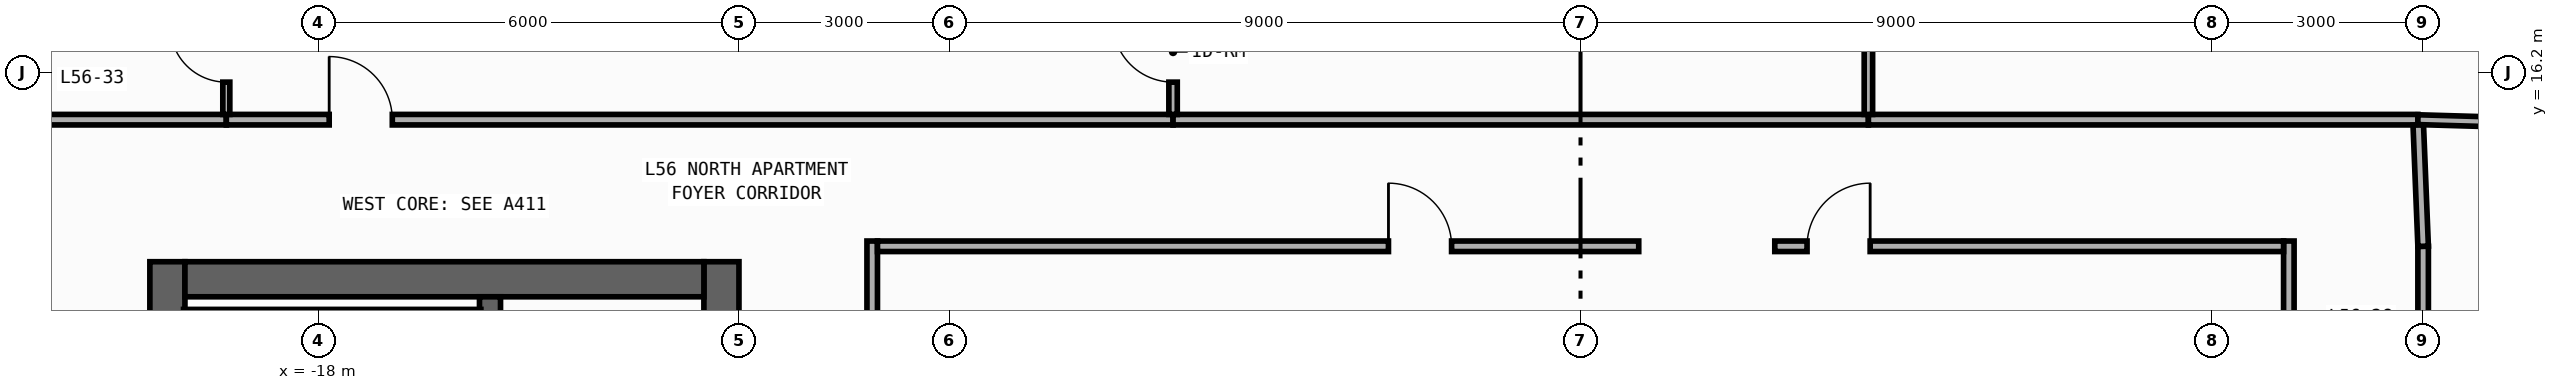
"""IFC4 building model, lengths in metres.
Left out: names, types, materials, properties, quantities, classifications, styles, units other than length and angle.
Written with IfcOpenShell. Run it as: python <this file> out.ifc"""

import sys

from ifc_helpers import new_model, si_unit, direction, frame, frame_2d, origin, place, context, subcontext, project, spatial, rectangle, extrude, element, fill, save


model = new_model("IFC4")
c1 = context("Model", 3, precision=1e-05, world=origin(), true_north=direction((0.0, 1.0)))
c2 = subcontext(c1, "Body", "Model", "MODEL_VIEW")
j1 = project(units=[si_unit("LENGTHUNIT", "METRE"), si_unit("PLANEANGLEUNIT", "RADIAN")], contexts=[c1])
p1 = place(None, origin())
s1 = spatial("IfcSite", under=j1, at=p1, CompositionType="ELEMENT")
p2 = place(p1, origin())
s2 = spatial("IfcBuilding", under=s1, at=p2, CompositionType="ELEMENT")
p3 = place(p2, frame((0.0, 0.0, 240.4)))
s3 = spatial("IfcBuildingStorey", under=s2, at=p3, CompositionType="ELEMENT", Elevation=240.4)
p4 = place(p3, frame((-20.15, -13.5, 0.0), z_axis=(0.0, 0.0, 1.0), x_axis=(0.0, 1.0, 0.0)))
e1 = element("IfcWall", 1, at=p4, inside=s3, PredefinedType="SHEAR", context=c2, shape_type="SweptSolid", body=[
    extrude(rectangle(XDim=27.0, YDim=0.5, at=frame_2d((13.5, 0.0))), origin(), (0.0, 0.0, 1.0), 3.34),
])
p5 = place(p3, frame((-12.25, -13.5, 0.0), z_axis=(0.0, 0.0, 1.0), x_axis=(0.0, 1.0, 0.0)))
e2 = element("IfcWall", 2, at=p5, inside=s3, PredefinedType="SHEAR", context=c2, shape_type="SweptSolid", body=[
    extrude(rectangle(XDim=27.0, YDim=0.5, at=frame_2d((13.5, 0.0))), origin(), (0.0, 0.0, 1.0), 3.34),
])
p6 = place(p5, frame((15.175, 0.0, 0.0)))
e3 = element("IfcOpeningElement", 3, at=p6, cuts=e2, PredefinedType="OPENING", context=c2, shape_type="SweptSolid", body=[
    extrude(rectangle(XDim=0.85, YDim=2.1, at=frame_2d((0.425, 1.05))), frame((0.0, 0.26, 0.0), z_axis=(0.0, -1.0, 0.0), x_axis=(1.0, 0.0, 0.0)), (0.0, 0.0, 1.0), 0.52),
])
p7 = place(p5, frame((21.275, 0.0, 0.0)))
e4 = element("IfcOpeningElement", 4, at=p7, cuts=e2, PredefinedType="OPENING", context=c2, shape_type="SweptSolid", body=[
    extrude(rectangle(XDim=0.85, YDim=2.1, at=frame_2d((0.425, 1.05))), frame((0.0, 0.26, 0.0), z_axis=(0.0, -1.0, 0.0), x_axis=(1.0, 0.0, 0.0)), (0.0, 0.0, 1.0), 0.52),
])
p8 = place(p5, frame((4.275, 0.0, 0.0)))
e5 = element("IfcOpeningElement", 5, at=p8, cuts=e2, PredefinedType="OPENING", context=c2, shape_type="SweptSolid", body=[
    extrude(rectangle(XDim=0.85, YDim=2.1, at=frame_2d((0.425, 1.05))), frame((0.0, 0.26, 0.0), z_axis=(0.0, -1.0, 0.0), x_axis=(1.0, 0.0, 0.0)), (0.0, 0.0, 1.0), 0.52),
])
p9 = place(p5, frame((10.275, 0.0, 0.0)))
e6 = element("IfcOpeningElement", 6, at=p9, cuts=e2, PredefinedType="OPENING", context=c2, shape_type="SweptSolid", body=[
    extrude(rectangle(XDim=0.85, YDim=2.1, at=frame_2d((0.425, 1.05))), frame((0.0, 0.26, 0.0), z_axis=(0.0, -1.0, 0.0), x_axis=(1.0, 0.0, 0.0)), (0.0, 0.0, 1.0), 0.52),
])
p10 = place(p5, frame((12.725, 0.0, 0.0)))
e7 = element("IfcOpeningElement", 7, at=p10, cuts=e2, PredefinedType="OPENING", context=c2, shape_type="SweptSolid", body=[
    extrude(rectangle(XDim=1.15, YDim=2.2, at=frame_2d((0.575, 1.1))), frame((0.0, 0.26, 0.0), z_axis=(0.0, -1.0, 0.0), x_axis=(1.0, 0.0, 0.0)), (0.0, 0.0, 1.0), 0.52),
])
p11 = place(p5, frame((1.625, 0.0, 0.0)))
e8 = element("IfcOpeningElement", 8, at=p11, cuts=e2, PredefinedType="OPENING", context=c2, shape_type="SweptSolid", body=[
    extrude(rectangle(XDim=0.85, YDim=2.1, at=frame_2d((0.425, 1.05))), frame((0.0, 0.26, 0.0), z_axis=(0.0, -1.0, 0.0), x_axis=(1.0, 0.0, 0.0)), (0.0, 0.0, 1.0), 0.52),
])
p12 = place(p3, frame((-19.9, 13.25, 0.0), z_axis=(0.0, 0.0, 1.0), x_axis=(1.0, 0.0, 0.0)))
e9 = element("IfcWall", 9, at=p12, inside=s3, PredefinedType="SHEAR", context=c2, shape_type="SweptSolid", body=[
    extrude(rectangle(XDim=7.4, YDim=0.5, at=frame_2d((3.7, 0.0))), origin(), (0.0, 0.0, 1.0), 3.34),
])
p13 = place(p3, frame((-15.55, -13.0, 0.0), z_axis=(0.0, 0.0, 1.0), x_axis=(0.0, 1.0, 0.0)))
e10 = element("IfcWall", 10, at=p13, inside=s3, PredefinedType="SHEAR", context=c2, shape_type="SweptSolid", body=[
    extrude(rectangle(XDim=26.0, YDim=0.3, at=frame_2d((13.0, 0.0))), origin(), (0.0, 0.0, 1.0), 3.34),
])
p14 = place(p13, frame((12.225, 0.0, 0.0)))
e11 = element("IfcOpeningElement", 11, at=p14, cuts=e10, PredefinedType="OPENING", context=c2, shape_type="SweptSolid", body=[
    extrude(rectangle(XDim=1.15, YDim=2.2, at=frame_2d((0.575, 1.1))), frame((0.0, 0.16, 0.0), z_axis=(0.0, -1.0, 0.0), x_axis=(1.0, 0.0, 0.0)), (0.0, 0.0, 1.0), 0.32),
])
p15 = place(p13, frame((1.125, 0.0, 0.0)))
e12 = element("IfcOpeningElement", 12, at=p15, cuts=e10, PredefinedType="OPENING", context=c2, shape_type="SweptSolid", body=[
    extrude(rectangle(XDim=0.85, YDim=2.1, at=frame_2d((0.425, 1.05))), frame((0.0, 0.16, 0.0), z_axis=(0.0, -1.0, 0.0), x_axis=(1.0, 0.0, 0.0)), (0.0, 0.0, 1.0), 0.32),
])
p16 = place(p3, frame((-19.92, 12.71, 0.0), z_axis=(0.0, 0.0, 1.0), x_axis=(1.0, 0.0, 0.0)))
e13 = element("IfcWall", 13, at=p16, inside=s3, PredefinedType="SHEAR", context=c2, shape_type="SweptSolid", body=[
    extrude(rectangle(XDim=4.24, YDim=0.22, at=frame_2d((2.12, 0.0))), origin(), (0.0, 0.0, 1.0), 3.34),
])
p17 = place(p3, frame((-10.1, 2.39, 0.0), z_axis=(0.0, 0.0, 1.0), x_axis=(0.0, 1.0, 0.0)))
e14 = element("IfcWall", 14, at=p17, inside=s3, PredefinedType="PARTITIONING", context=c2, shape_type="SweptSolid", body=[
    extrude(rectangle(XDim=11.405, YDim=0.15, at=frame_2d((5.703, 0.0))), origin(), (0.0, 0.0, 1.0), 3.34),
])
p18 = place(p17, frame((2.5, 0.0, 0.0)))
e15 = element("IfcOpeningElement", 15, at=p18, cuts=e14, PredefinedType="OPENING", context=c2, shape_type="SweptSolid", body=[
    extrude(rectangle(XDim=0.9, YDim=2.15, at=frame_2d((0.45, 1.075))), frame((0.0, 0.085, 0.0), z_axis=(0.0, -1.0, 0.0), x_axis=(1.0, 0.0, 0.0)), (0.0, 0.0, 1.0), 0.17),
])
p19 = place(p3, frame((12.015, 7.2, 0.0), z_axis=(0.0, 0.0, 1.0), x_axis=(0.0, 1.0, 0.0)))
e16 = element("IfcWall", 16, at=p19, inside=s3, PredefinedType="PARTITIONING", context=c2, shape_type="SweptSolid", body=[
    extrude(rectangle(XDim=6.52, YDim=0.15, at=frame_2d((3.26, 0.0))), origin(), (0.0, 0.0, 1.0), 3.34),
])
p20 = place(p19, frame((0.67, 0.0, 0.0)))
e17 = element("IfcOpeningElement", 17, at=p20, cuts=e16, PredefinedType="OPENING", context=c2, shape_type="SweptSolid", body=[
    extrude(rectangle(XDim=0.9, YDim=2.15, at=frame_2d((0.45, 1.075))), frame((0.0, 0.085, 0.0), z_axis=(0.0, -1.0, 0.0), x_axis=(1.0, 0.0, 0.0)), (0.0, 0.0, 1.0), 0.17),
])
p21 = place(p3, frame((10.1, 2.39, 0.0), z_axis=(0.0, 0.0, 1.0), x_axis=(0.0, 1.0, 0.0)))
e18 = element("IfcWall", 18, at=p21, inside=s3, PredefinedType="PARTITIONING", context=c2, shape_type="SweptSolid", body=[
    extrude(rectangle(XDim=11.405, YDim=0.15, at=frame_2d((5.703, 0.0))), origin(), (0.0, 0.0, 1.0), 3.34),
])
p22 = place(p21, frame((2.5, 0.0, 0.0)))
e19 = element("IfcOpeningElement", 19, at=p22, cuts=e18, PredefinedType="OPENING", context=c2, shape_type="SweptSolid", body=[
    extrude(rectangle(XDim=0.9, YDim=2.15, at=frame_2d((0.45, 1.075))), frame((0.0, 0.085, 0.0), z_axis=(0.0, -1.0, 0.0), x_axis=(1.0, 0.0, 0.0)), (0.0, 0.0, 1.0), 0.17),
])
p23 = place(p3, frame((-21.955, 15.525, 0.0), z_axis=(0.0, 0.0, 1.0), x_axis=(1.0, 0.0, 0.0)))
e20 = element("IfcWall", 20, at=p23, inside=s3, PredefinedType="PARTITIONING", context=c2, shape_type="SweptSolid", body=[
    extrude(rectangle(XDim=2.645, YDim=0.15, at=frame_2d((1.323, 0.0))), origin(), (0.0, 0.0, 1.0), 3.34),
])
p24 = place(p3, frame((-19.31, 15.525, 0.0), z_axis=(0.0, 0.0, 1.0), x_axis=(1.0, 0.0, 0.0)))
e21 = element("IfcWall", 21, at=p24, inside=s3, PredefinedType="PARTITIONING", context=c2, shape_type="SweptSolid", body=[
    extrude(rectangle(XDim=13.5, YDim=0.15, at=frame_2d((6.75, 0.0))), origin(), (0.0, 0.0, 1.0), 3.34),
])
p25 = place(p24, frame((1.467, 0.0, 0.0)))
e22 = element("IfcOpeningElement", 22, at=p25, cuts=e21, PredefinedType="OPENING", context=c2, shape_type="SweptSolid", body=[
    extrude(rectangle(XDim=0.9, YDim=2.15, at=frame_2d((0.45, 1.075))), frame((0.0, 0.085, 0.0), z_axis=(0.0, -1.0, 0.0), x_axis=(1.0, 0.0, 0.0)), (0.0, 0.0, 1.0), 0.17),
])
p26 = place(p3, frame((-5.81, 15.525, 0.0), z_axis=(0.0, 0.0, 1.0), x_axis=(1.0, 0.0, 0.0)))
e23 = element("IfcWall", 23, at=p26, inside=s3, PredefinedType="PARTITIONING", context=c2, shape_type="SweptSolid", body=[
    extrude(rectangle(XDim=9.915, YDim=0.15, at=frame_2d((4.958, 0.0))), origin(), (0.0, 0.0, 1.0), 3.34),
])
p27 = place(p3, frame((4.105, 15.525, 0.0), z_axis=(0.0, 0.0, 1.0), x_axis=(1.0, 0.0, 0.0)))
e24 = element("IfcWall", 24, at=p27, inside=s3, PredefinedType="PARTITIONING", context=c2, shape_type="SweptSolid", body=[
    extrude(rectangle(XDim=7.835, YDim=0.15, at=frame_2d((3.917, 0.0))), origin(), (0.0, 0.0, 1.0), 3.34),
])
p28 = place(p3, frame((12.015, 13.72, 0.0), z_axis=(0.0, 0.0, 1.0), x_axis=(-0.040046877756, 0.99919780203, 0.0)))
e25 = element("IfcWall", 25, at=p28, inside=s3, PredefinedType="PARTITIONING", context=c2, shape_type="SweptSolid", body=[
    extrude(rectangle(XDim=1.731, YDim=0.15, at=frame_2d((0.866, 0.0))), origin(), (0.0, 0.0, 1.0), 3.34),
])
p29 = place(p3, frame((-10.025, 13.72, 0.0), z_axis=(0.0, 0.0, 1.0), x_axis=(1.0, 0.0, 0.0)))
e26 = element("IfcWall", 26, at=p29, inside=s3, PredefinedType="PARTITIONING", context=c2, shape_type="SweptSolid", body=[
    extrude(rectangle(XDim=10.855, YDim=0.15, at=frame_2d((5.427, 0.0))), origin(), (0.0, 0.0, 1.0), 3.34),
])
p30 = place(p29, frame((7.286, 0.0, 0.0)))
e27 = element("IfcOpeningElement", 27, at=p30, cuts=e26, PredefinedType="OPENING", context=c2, shape_type="SweptSolid", body=[
    extrude(rectangle(XDim=0.9, YDim=2.15, at=frame_2d((0.45, 1.075))), frame((0.0, 0.085, 0.0), z_axis=(0.0, -1.0, 0.0), x_axis=(1.0, 0.0, 0.0)), (0.0, 0.0, 1.0), 0.17),
])
p31 = place(p3, frame((2.77, 13.72, 0.0), z_axis=(0.0, 0.0, 1.0), x_axis=(1.0, 0.0, 0.0)))
e28 = element("IfcWall", 28, at=p31, inside=s3, PredefinedType="PARTITIONING", context=c2, shape_type="SweptSolid", body=[
    extrude(rectangle(XDim=7.255, YDim=0.15, at=frame_2d((3.627, 0.0))), origin(), (0.0, 0.0, 1.0), 3.34),
])
p32 = place(p31, frame((0.46, 0.0, 0.0)))
e29 = element("IfcOpeningElement", 29, at=p32, cuts=e28, PredefinedType="OPENING", context=c2, shape_type="SweptSolid", body=[
    extrude(rectangle(XDim=0.9, YDim=2.15, at=frame_2d((0.45, 1.075))), frame((0.0, 0.085, 0.0), z_axis=(0.0, -1.0, 0.0), x_axis=(1.0, 0.0, 0.0)), (0.0, 0.0, 1.0), 0.17),
])
p33 = place(p3, frame((-19.31, 15.6, 0.0), z_axis=(0.0, 0.0, 1.0), x_axis=(0.0, 1.0, 0.0)))
e30 = element("IfcWall", 30, at=p33, inside=s3, PredefinedType="PARTITIONING", context=c2, shape_type="SweptSolid", body=[
    extrude(rectangle(XDim=2.5, YDim=0.1, at=frame_2d((1.25, 0.0))), origin(), (0.0, 0.0, 1.0), 3.34),
])
p34 = place(p33, frame((0.46, 0.0, 0.0)))
e31 = element("IfcOpeningElement", 31, at=p34, cuts=e30, PredefinedType="OPENING", context=c2, shape_type="SweptSolid", body=[
    extrude(rectangle(XDim=0.8, YDim=2.1, at=frame_2d((0.4, 1.05))), frame((0.0, 0.06, 0.0), z_axis=(0.0, -1.0, 0.0), x_axis=(1.0, 0.0, 0.0)), (0.0, 0.0, 1.0), 0.12),
])
p35 = place(p3, frame((-5.81, 15.6, 0.0), z_axis=(0.0, 0.0, 1.0), x_axis=(0.0, 1.0, 0.0)))
e32 = element("IfcWall", 32, at=p35, inside=s3, PredefinedType="PARTITIONING", context=c2, shape_type="SweptSolid", body=[
    extrude(rectangle(XDim=4.5, YDim=0.12, at=frame_2d((2.25, 0.0))), origin(), (0.0, 0.0, 1.0), 3.34),
])
p36 = place(p35, frame((0.46, 0.0, 0.0)))
e33 = element("IfcOpeningElement", 33, at=p36, cuts=e32, PredefinedType="OPENING", context=c2, shape_type="SweptSolid", body=[
    extrude(rectangle(XDim=0.86, YDim=2.15, at=frame_2d((0.43, 1.075))), frame((0.0, 0.07, 0.0), z_axis=(0.0, -1.0, 0.0), x_axis=(1.0, 0.0, 0.0)), (0.0, 0.0, 1.0), 0.14),
])
p37 = place(p3, frame((4.105, 15.6, 0.0), z_axis=(0.0, 0.0, 1.0), x_axis=(0.0, 1.0, 0.0)))
e34 = element("IfcWall", 34, at=p37, inside=s3, PredefinedType="PARTITIONING", context=c2, shape_type="SweptSolid", body=[
    extrude(rectangle(XDim=9.255, YDim=0.12, at=frame_2d((4.627, 0.0))), origin(), (0.0, 0.0, 1.0), 3.34),
])
p38 = place(p37, frame((7.995, 0.0, 0.0)))
e35 = element("IfcOpeningElement", 35, at=p38, cuts=e34, PredefinedType="OPENING", context=c2, shape_type="SweptSolid", body=[
    extrude(rectangle(XDim=0.8, YDim=2.1, at=frame_2d((0.4, 1.05))), frame((0.0, 0.07, 0.0), z_axis=(0.0, -1.0, 0.0), x_axis=(1.0, 0.0, 0.0)), (0.0, 0.0, 1.0), 0.14),
])
p39 = place(p3, frame((11.94, 15.525, 0.0), z_axis=(0.0, 0.0, 1.0), x_axis=(0.99958000177, -0.028979649098, 0.0)))
e36 = element("IfcWall", 36, at=p39, inside=s3, PredefinedType="PARTITIONING", context=c2, shape_type="SweptSolid", body=[
    extrude(rectangle(XDim=2.241, YDim=0.14, at=frame_2d((1.121, 0.0))), origin(), (0.0, 0.0, 1.0), 3.34),
])
p40 = place(p25, origin())
e37 = element("IfcDoor", 37, at=p40, inside=s3, OperationType="SINGLE_SWING_LEFT", PredefinedType="DOOR", context=c2, shape_type="SweptSolid", body=[
    extrude(rectangle(XDim=0.9, YDim=2.15, at=frame_2d((0.45, 1.075))), frame((0.0, 0.025, 0.0), z_axis=(0.0, -1.0, 0.0), x_axis=(1.0, 0.0, 0.0)), (0.0, 0.0, 1.0), 0.05),
])
fill(e22, e37)
p41 = place(p30, origin())
e38 = element("IfcDoor", 38, at=p41, inside=s3, OperationType="SINGLE_SWING_LEFT", PredefinedType="DOOR", context=c2, shape_type="SweptSolid", body=[
    extrude(rectangle(XDim=0.9, YDim=2.15, at=frame_2d((0.45, 1.075))), frame((0.0, 0.025, 0.0), z_axis=(0.0, -1.0, 0.0), x_axis=(1.0, 0.0, 0.0)), (0.0, 0.0, 1.0), 0.05),
])
fill(e27, e38)
p42 = place(p32, origin())
e39 = element("IfcDoor", 39, at=p42, inside=s3, OperationType="SINGLE_SWING_RIGHT", PredefinedType="DOOR", context=c2, shape_type="SweptSolid", body=[
    extrude(rectangle(XDim=0.9, YDim=2.15, at=frame_2d((0.45, 1.075))), frame((0.0, 0.025, 0.0), z_axis=(0.0, -1.0, 0.0), x_axis=(1.0, 0.0, 0.0)), (0.0, 0.0, 1.0), 0.05),
])
fill(e29, e39)
p43 = place(p34, origin())
e40 = element("IfcDoor", 40, at=p43, inside=s3, OperationType="SINGLE_SWING_RIGHT", PredefinedType="DOOR", context=c2, shape_type="SweptSolid", body=[
    extrude(rectangle(XDim=0.8, YDim=2.1, at=frame_2d((0.4, 1.05))), frame((0.0, 0.025, 0.0), z_axis=(0.0, -1.0, 0.0), x_axis=(1.0, 0.0, 0.0)), (0.0, 0.0, 1.0), 0.05),
])
fill(e31, e40)
p44 = place(p36, origin())
e41 = element("IfcDoor", 41, at=p44, inside=s3, OperationType="SINGLE_SWING_RIGHT", PredefinedType="DOOR", context=c2, shape_type="SweptSolid", body=[
    extrude(rectangle(XDim=0.86, YDim=2.15, at=frame_2d((0.43, 1.075))), frame((0.0, 0.025, 0.0), z_axis=(0.0, -1.0, 0.0), x_axis=(1.0, 0.0, 0.0)), (0.0, 0.0, 1.0), 0.05),
])
fill(e33, e41)
save(model, sys.argv[1])
